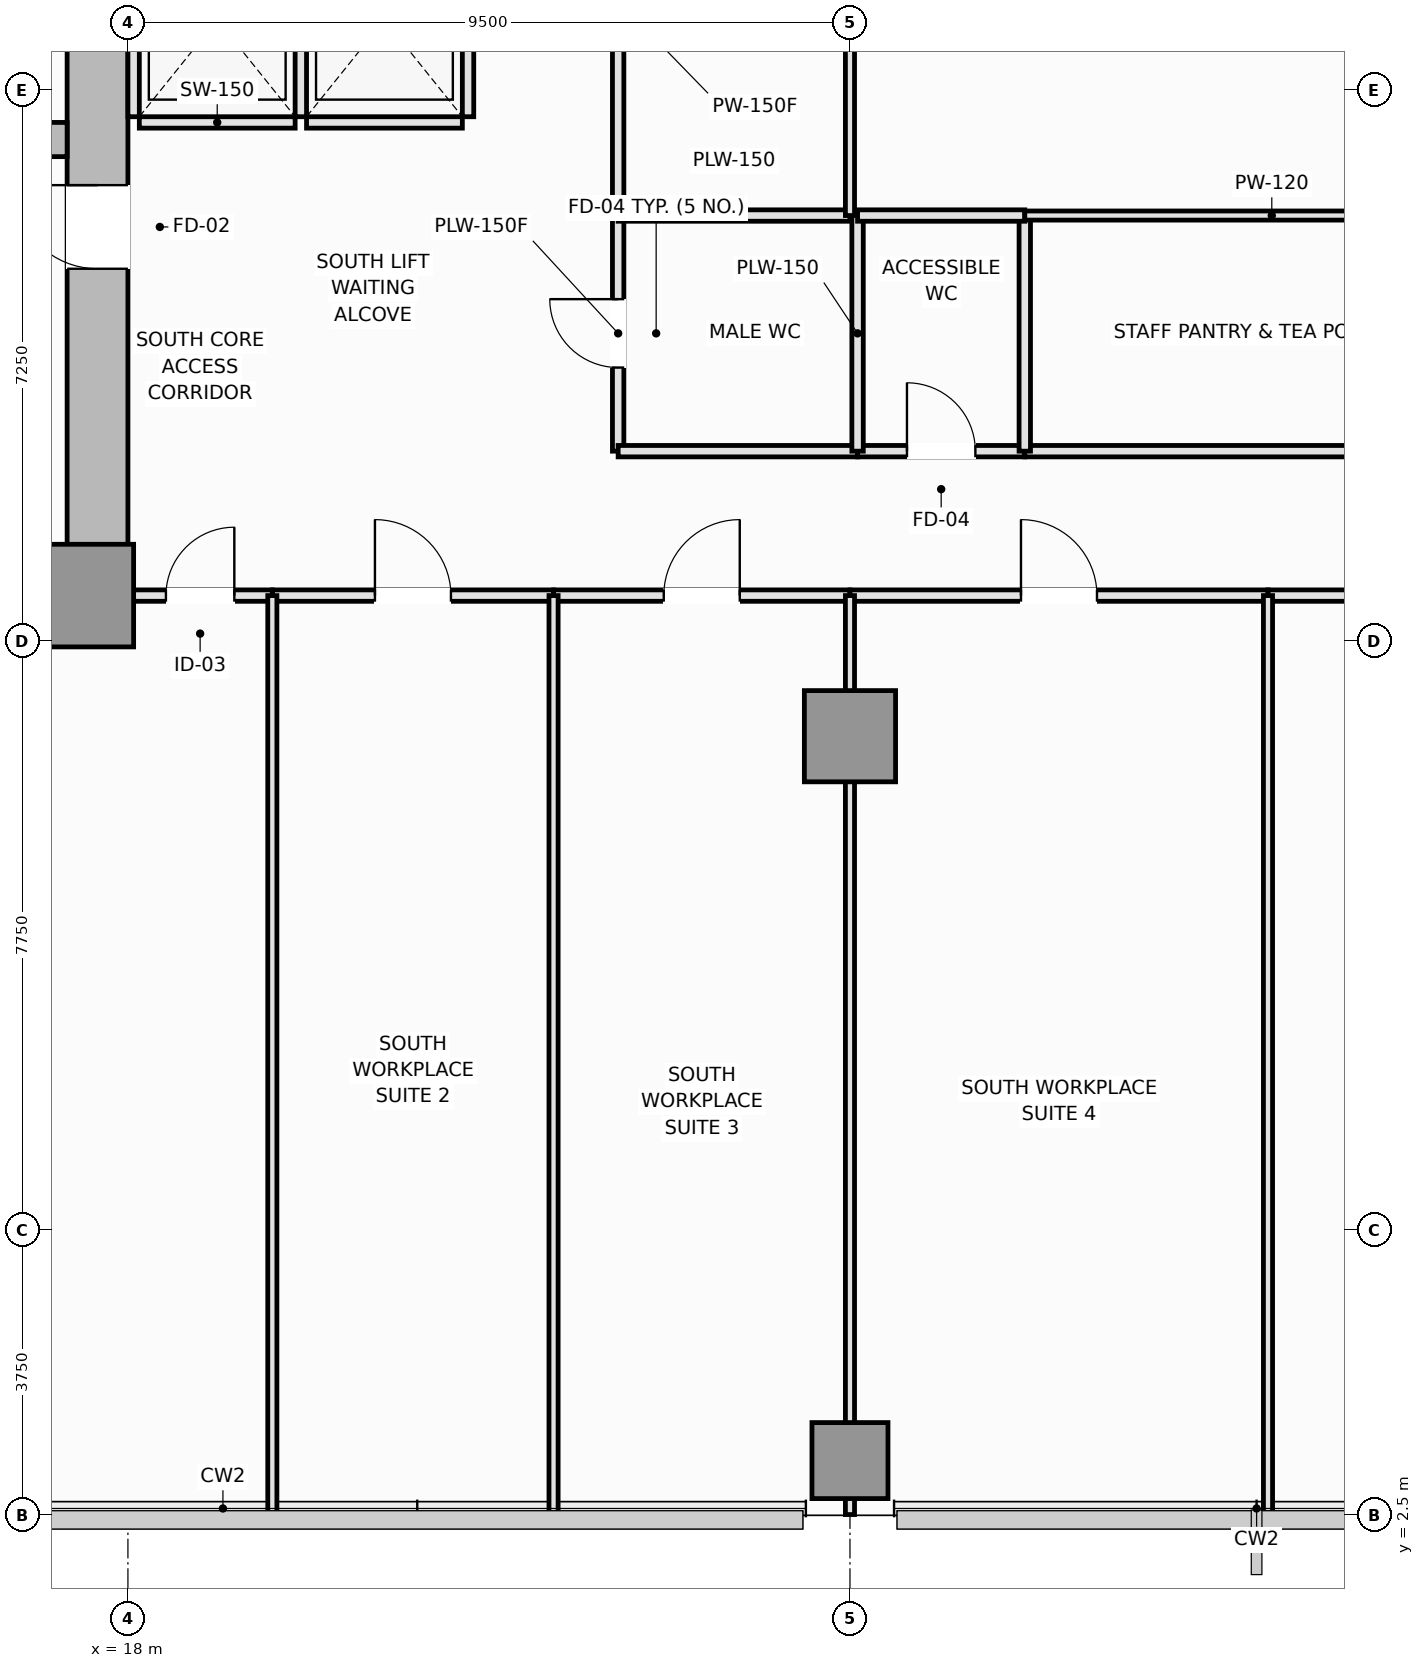
"""IFC4 building model, lengths in metres.
Left out: names, types, materials, properties, quantities, classifications, styles, units other than length and angle.
Written with IfcOpenShell. Run it as: python <this file> out.ifc"""

import sys

from ifc_helpers import new_model, si_unit, direction, frame, frame_2d, origin, origin_2d, place, context, subcontext, project, spatial, rectangle, extrude, element, fill, save


model = new_model("IFC4")
c1 = context("Model", 3, precision=1e-05, world=origin(), true_north=direction((0.0, 1.0)))
c2 = subcontext(c1, "Body", "Model", "MODEL_VIEW")
j1 = project(units=[si_unit("LENGTHUNIT", "METRE"), si_unit("PLANEANGLEUNIT", "RADIAN")], contexts=[c1])
p1 = place(None, origin())
s1 = spatial("IfcSite", under=j1, at=p1, CompositionType="ELEMENT")
p2 = place(p1, origin())
s2 = spatial("IfcBuilding", under=s1, at=p2, CompositionType="ELEMENT")
p3 = place(p2, frame((0.0, 0.0, 57.55)))
s3 = spatial("IfcBuildingStorey", under=s2, at=p3, CompositionType="ELEMENT", Elevation=57.55)
p4 = place(p3, frame((4.5, 14.4, 0.0), z_axis=(0.0, 0.0, 1.0), x_axis=(1.0, 0.0, 0.0)))
e1 = element("IfcWall", 1, at=p4, inside=s3, PredefinedType="SHEAR", context=c2, shape_type="SweptSolid", body=[
    extrude(rectangle(XDim=13.5, YDim=0.8, at=frame_2d((6.75, 0.0))), origin(), (0.0, 0.0, 1.0), 3.55),
])
p5 = place(p3, frame((17.6, 14.8, 0.0), z_axis=(0.0, 0.0, 1.0), x_axis=(0.0, 1.0, 0.0)))
e2 = element("IfcWall", 2, at=p5, inside=s3, PredefinedType="SHEAR", context=c2, shape_type="SweptSolid", body=[
    extrude(rectangle(XDim=8.65, YDim=0.8, at=frame_2d((4.325, 0.0))), origin(), (0.0, 0.0, 1.0), 3.55),
])
p6 = place(p5, frame((4.1, 0.0, 0.0)))
e3 = element("IfcOpeningElement", 3, at=p6, cuts=e2, PredefinedType="OPENING", context=c2, shape_type="SweptSolid", body=[
    extrude(rectangle(XDim=1.1, YDim=2.15, at=frame_2d((0.55, 1.075))), frame((0.0, 0.41, 0.0), z_axis=(0.0, -1.0, 0.0), x_axis=(1.0, 0.0, 0.0)), (0.0, 0.0, 1.0), 0.82),
])
p7 = place(p3, frame((5.3, 20.6, 0.0), z_axis=(0.0, 0.0, 1.0), x_axis=(1.0, 0.0, 0.0)))
e4 = element("IfcWall", 4, at=p7, inside=s3, PredefinedType="SHEAR", context=c2, shape_type="SweptSolid", body=[
    extrude(rectangle(XDim=11.9, YDim=0.45, at=frame_2d((5.95, 0.0))), origin(), (0.0, 0.0, 1.0), 3.55),
])
p8 = place(p3, frame((17.4, 14.6, 0.0), z_axis=(0.0, 0.0, 1.0), x_axis=(1.0, 0.0, 0.0)))
e5 = element("IfcColumn", 5, at=p8, inside=s3, PredefinedType="PILASTER", context=c2, shape_type="SweptSolid", body=[
    extrude(rectangle(XDim=1.35, YDim=1.35, at=origin_2d()), origin(), (0.0, 0.0, 1.0), 3.55),
])
p9 = place(p3, frame((27.5, 12.75, 0.0), z_axis=(0.0, 0.0, 1.0), x_axis=(1.0, 0.0, 0.0)))
e6 = element("IfcColumn", 6, at=p9, inside=s3, PredefinedType="COLUMN", context=c2, shape_type="SweptSolid", body=[
    extrude(rectangle(XDim=1.2, YDim=1.2, at=origin_2d()), origin(), (0.0, 0.0, 1.0), 3.55),
])
p10 = place(p3, frame((27.5, 3.22, 0.0), z_axis=(0.0, 0.0, 1.0), x_axis=(1.0, 0.0, 0.0)))
e7 = element("IfcColumn", 7, at=p10, inside=s3, PredefinedType="COLUMN", context=c2, shape_type="SweptSolid", body=[
    extrude(rectangle(XDim=1.0, YDim=1.0, at=origin_2d()), origin(), (0.0, 0.0, 1.0), 3.55),
])
p11 = place(p3, frame((18.15, 20.825, 0.0), z_axis=(0.0, 0.0, 1.0), x_axis=(1.0, 0.0, 0.0)))
e8 = element("IfcWall", 8, at=p11, inside=s3, PredefinedType="PARTITIONING", context=c2, shape_type="SweptSolid", body=[
    extrude(rectangle(XDim=2.05, YDim=0.15, at=frame_2d((1.025, 0.0))), origin(), (0.0, 0.0, 1.0), 3.37),
])
for number, where, z_axis, x_axis in (
    (9, (18.075, 20.9, 0.0), (0.0, 0.0, 1.0), (0.0, 1.0, 0.0)),
    (10, (20.275, 20.9, 0.0), (0.0, 0.0, 1.0), (0.0, 1.0, 0.0)),
):
    element("IfcWall", number, at=place(p3, frame(where, z_axis=z_axis, x_axis=x_axis)), inside=s3, PredefinedType="PARTITIONING", context=c2, shape_type="SweptSolid", body=[
        extrude(rectangle(XDim=2.55, YDim=0.15, at=frame_2d((1.275, 0.0))), origin(), (0.0, 0.0, 1.0), 3.37),
    ])
p12 = place(p3, frame((20.35, 20.825, 0.0), z_axis=(0.0, 0.0, 1.0), x_axis=(1.0, 0.0, 0.0)))
e11 = element("IfcWall", 11, at=p12, inside=s3, PredefinedType="PARTITIONING", context=c2, shape_type="SweptSolid", body=[
    extrude(rectangle(XDim=2.05, YDim=0.15, at=frame_2d((1.025, 0.0))), origin(), (0.0, 0.0, 1.0), 3.37),
])
p13 = place(p3, frame((22.475, 20.9, 0.0), z_axis=(0.0, 0.0, 1.0), x_axis=(0.0, 1.0, 0.0)))
e12 = element("IfcWall", 12, at=p13, inside=s3, PredefinedType="PARTITIONING", context=c2, shape_type="SweptSolid", body=[
    extrude(rectangle(XDim=2.55, YDim=0.15, at=frame_2d((1.275, 0.0))), origin(), (0.0, 0.0, 1.0), 3.37),
])
p14 = place(p3, frame((24.45, 16.5, 0.0), z_axis=(0.0, 0.0, 1.0), x_axis=(0.0, 1.0, 0.0)))
e13 = element("IfcWall", 13, at=p14, inside=s3, PredefinedType="PLUMBINGWALL", context=c2, shape_type="SweptSolid", body=[
    extrude(rectangle(XDim=3.1, YDim=0.15, at=frame_2d((1.55, 0.0))), origin(), (0.0, 0.0, 1.0), 3.37),
])
p15 = place(p14, frame((1.1, 0.0, 0.0)))
e14 = element("IfcOpeningElement", 14, at=p15, cuts=e13, PredefinedType="OPENING", context=c2, shape_type="SweptSolid", body=[
    extrude(rectangle(XDim=0.9, YDim=2.1, at=frame_2d((0.45, 1.05))), frame((0.0, 0.085, 0.0), z_axis=(0.0, -1.0, 0.0), x_axis=(1.0, 0.0, 0.0)), (0.0, 0.0, 1.0), 0.17),
])
p16 = place(p3, frame((24.45, 19.6, 0.0), z_axis=(0.0, 0.0, 1.0), x_axis=(0.0, 1.0, 0.0)))
e15 = element("IfcWall", 15, at=p16, inside=s3, PredefinedType="PARTITIONING", context=c2, shape_type="SweptSolid", body=[
    extrude(rectangle(XDim=5.65, YDim=0.15, at=frame_2d((2.825, 0.0))), origin(), (0.0, 0.0, 1.0), 3.37),
])
p17 = place(p16, frame((2.325, 0.0, 0.0)))
e16 = element("IfcOpeningElement", 16, at=p17, cuts=e15, PredefinedType="OPENING", context=c2, shape_type="SweptSolid", body=[
    extrude(rectangle(XDim=1.0, YDim=2.15, at=frame_2d((0.5, 1.075))), frame((0.0, 0.085, 0.0), z_axis=(0.0, -1.0, 0.0), x_axis=(1.0, 0.0, 0.0)), (0.0, 0.0, 1.0), 0.17),
])
p18 = place(p3, frame((24.45, 16.5, 0.0), z_axis=(0.0, 0.0, 1.0), x_axis=(1.0, 0.0, 0.0)))
e17 = element("IfcWall", 17, at=p18, inside=s3, PredefinedType="PLUMBINGWALL", context=c2, shape_type="SweptSolid", body=[
    extrude(rectangle(XDim=3.15, YDim=0.15, at=frame_2d((1.575, 0.0))), origin(), (0.0, 0.0, 1.0), 3.37),
])
p19 = place(p3, frame((27.6, 16.5, 0.0), z_axis=(0.0, 0.0, 1.0), x_axis=(1.0, 0.0, 0.0)))
e18 = element("IfcWall", 18, at=p19, inside=s3, PredefinedType="PLUMBINGWALL", context=c2, shape_type="SweptSolid", body=[
    extrude(rectangle(XDim=2.2, YDim=0.15, at=frame_2d((1.1, 0.0))), origin(), (0.0, 0.0, 1.0), 3.37),
])
p20 = place(p19, frame((0.65, 0.0, 0.0)))
e19 = element("IfcOpeningElement", 19, at=p20, cuts=e18, PredefinedType="OPENING", context=c2, shape_type="SweptSolid", body=[
    extrude(rectangle(XDim=0.9, YDim=2.1, at=frame_2d((0.45, 1.05))), frame((0.0, 0.085, 0.0), z_axis=(0.0, -1.0, 0.0), x_axis=(1.0, 0.0, 0.0)), (0.0, 0.0, 1.0), 0.17),
])
p21 = place(p3, frame((29.8, 16.5, 0.0), z_axis=(0.0, 0.0, 1.0), x_axis=(1.0, 0.0, 0.0)))
e20 = element("IfcWall", 20, at=p21, inside=s3, PredefinedType="PARTITIONING", context=c2, shape_type="SweptSolid", body=[
    extrude(rectangle(XDim=6.5, YDim=0.15, at=frame_2d((3.25, 0.0))), origin(), (0.0, 0.0, 1.0), 3.37),
])
p22 = place(p3, frame((18.0, 14.6, 0.0), z_axis=(0.0, 0.0, 1.0), x_axis=(1.0, 0.0, 0.0)))
e21 = element("IfcWall", 21, at=p22, inside=s3, PredefinedType="PARTITIONING", context=c2, shape_type="SweptSolid", body=[
    extrude(rectangle(XDim=1.9, YDim=0.15, at=frame_2d((0.95, 0.0))), origin(), (0.0, 0.0, 1.0), 3.37),
])
p23 = place(p22, frame((0.5, 0.0, 0.0)))
e22 = element("IfcOpeningElement", 22, at=p23, cuts=e21, PredefinedType="OPENING", context=c2, shape_type="SweptSolid", body=[
    extrude(rectangle(XDim=0.9, YDim=2.1, at=frame_2d((0.45, 1.05))), frame((0.0, 0.085, 0.0), z_axis=(0.0, -1.0, 0.0), x_axis=(1.0, 0.0, 0.0)), (0.0, 0.0, 1.0), 0.17),
])
p24 = place(p3, frame((19.9, 14.6, 0.0), z_axis=(0.0, 0.0, 1.0), x_axis=(1.0, 0.0, 0.0)))
e23 = element("IfcWall", 23, at=p24, inside=s3, PredefinedType="PARTITIONING", context=c2, shape_type="SweptSolid", body=[
    extrude(rectangle(XDim=3.7, YDim=0.15, at=frame_2d((1.85, 0.0))), origin(), (0.0, 0.0, 1.0), 3.37),
])
p25 = place(p24, frame((1.35, 0.0, 0.0)))
e24 = element("IfcOpeningElement", 24, at=p25, cuts=e23, PredefinedType="OPENING", context=c2, shape_type="SweptSolid", body=[
    extrude(rectangle(XDim=1.0, YDim=2.15, at=frame_2d((0.5, 1.075))), frame((0.0, 0.085, 0.0), z_axis=(0.0, -1.0, 0.0), x_axis=(1.0, 0.0, 0.0)), (0.0, 0.0, 1.0), 0.17),
])
p26 = place(p3, frame((23.6, 14.6, 0.0), z_axis=(0.0, 0.0, 1.0), x_axis=(1.0, 0.0, 0.0)))
e25 = element("IfcWall", 25, at=p26, inside=s3, PredefinedType="PARTITIONING", context=c2, shape_type="SweptSolid", body=[
    extrude(rectangle(XDim=3.9, YDim=0.15, at=frame_2d((1.95, 0.0))), origin(), (0.0, 0.0, 1.0), 3.37),
])
p27 = place(p26, frame((1.45, 0.0, 0.0)))
e26 = element("IfcOpeningElement", 26, at=p27, cuts=e25, PredefinedType="OPENING", context=c2, shape_type="SweptSolid", body=[
    extrude(rectangle(XDim=1.0, YDim=2.15, at=frame_2d((0.5, 1.075))), frame((0.0, 0.085, 0.0), z_axis=(0.0, -1.0, 0.0), x_axis=(1.0, 0.0, 0.0)), (0.0, 0.0, 1.0), 0.17),
])
p28 = place(p3, frame((27.5, 14.6, 0.0), z_axis=(0.0, 0.0, 1.0), x_axis=(1.0, 0.0, 0.0)))
e27 = element("IfcWall", 27, at=p28, inside=s3, PredefinedType="PARTITIONING", context=c2, shape_type="SweptSolid", body=[
    extrude(rectangle(XDim=5.5, YDim=0.15, at=frame_2d((2.75, 0.0))), origin(), (0.0, 0.0, 1.0), 3.37),
])
p29 = place(p28, frame((2.25, 0.0, 0.0)))
e28 = element("IfcOpeningElement", 28, at=p29, cuts=e27, PredefinedType="OPENING", context=c2, shape_type="SweptSolid", body=[
    extrude(rectangle(XDim=1.0, YDim=2.15, at=frame_2d((0.5, 1.075))), frame((0.0, 0.085, 0.0), z_axis=(0.0, -1.0, 0.0), x_axis=(1.0, 0.0, 0.0)), (0.0, 0.0, 1.0), 0.17),
])
p30 = place(p3, frame((33.0, 14.6, 0.0), z_axis=(0.0, 0.0, 1.0), x_axis=(1.0, 0.0, 0.0)))
e29 = element("IfcWall", 29, at=p30, inside=s3, PredefinedType="PARTITIONING", context=c2, shape_type="SweptSolid", body=[
    extrude(rectangle(XDim=5.2, YDim=0.15, at=frame_2d((2.6, 0.0))), origin(), (0.0, 0.0, 1.0), 3.37),
])
p31 = place(p30, frame((2.1, 0.0, 0.0)))
e30 = element("IfcOpeningElement", 30, at=p31, cuts=e29, PredefinedType="OPENING", context=c2, shape_type="SweptSolid", body=[
    extrude(rectangle(XDim=1.0, YDim=2.15, at=frame_2d((0.5, 1.075))), frame((0.0, 0.085, 0.0), z_axis=(0.0, -1.0, 0.0), x_axis=(1.0, 0.0, 0.0)), (0.0, 0.0, 1.0), 0.17),
])
p32 = place(p3, frame((27.6, 16.5, 0.0), z_axis=(0.0, 0.0, 1.0), x_axis=(0.0, 1.0, 0.0)))
e31 = element("IfcWall", 31, at=p32, inside=s3, PredefinedType="PLUMBINGWALL", context=c2, shape_type="SweptSolid", body=[
    extrude(rectangle(XDim=3.1, YDim=0.15, at=frame_2d((1.55, 0.0))), origin(), (0.0, 0.0, 1.0), 3.37),
])
p33 = place(p3, frame((24.45, 19.6, 0.0), z_axis=(0.0, 0.0, 1.0), x_axis=(1.0, 0.0, 0.0)))
e32 = element("IfcWall", 32, at=p33, inside=s3, PredefinedType="PLUMBINGWALL", context=c2, shape_type="SweptSolid", body=[
    extrude(rectangle(XDim=3.05, YDim=0.15, at=frame_2d((1.525, 0.0))), origin(), (0.0, 0.0, 1.0), 3.37),
])
p34 = place(p3, frame((29.8, 16.5, 0.0), z_axis=(0.0, 0.0, 1.0), x_axis=(0.0, 1.0, 0.0)))
e33 = element("IfcWall", 33, at=p34, inside=s3, PredefinedType="PLUMBINGWALL", context=c2, shape_type="SweptSolid", body=[
    extrude(rectangle(XDim=3.1, YDim=0.15, at=frame_2d((1.55, 0.0))), origin(), (0.0, 0.0, 1.0), 3.37),
])
p35 = place(p3, frame((27.6, 19.6, 0.0), z_axis=(0.0, 0.0, 1.0), x_axis=(1.0, 0.0, 0.0)))
e34 = element("IfcWall", 34, at=p35, inside=s3, PredefinedType="PLUMBINGWALL", context=c2, shape_type="SweptSolid", body=[
    extrude(rectangle(XDim=2.2, YDim=0.15, at=frame_2d((1.1, 0.0))), origin(), (0.0, 0.0, 1.0), 3.37),
])
p36 = place(p3, frame((29.8, 19.6, 0.0), z_axis=(0.0, 0.0, 1.0), x_axis=(1.0, 0.0, 0.0)))
e35 = element("IfcWall", 35, at=p36, inside=s3, PredefinedType="PARTITIONING", context=c2, shape_type="SweptSolid", body=[
    extrude(rectangle(XDim=6.5, YDim=0.12, at=frame_2d((3.25, 0.0))), origin(), (0.0, 0.0, 1.0), 3.37),
])
p37 = place(p3, frame((27.5, 19.6, 0.0), z_axis=(0.0, 0.0, 1.0), x_axis=(0.0, 1.0, 0.0)))
e36 = element("IfcWall", 36, at=p37, inside=s3, PredefinedType="PARTITIONING", context=c2, shape_type="SweptSolid", body=[
    extrude(rectangle(XDim=5.65, YDim=0.12, at=frame_2d((2.825, 0.0))), origin(), (0.0, 0.0, 1.0), 3.37),
])
for number, where, z_axis, x_axis in (
    (37, (19.9, 2.51, 0.0), (0.0, 0.0, 1.0), (0.0, 1.0, 0.0)),
    (38, (23.6, 2.51, 0.0), (0.0, 0.0, 1.0), (0.0, 1.0, 0.0)),
):
    element("IfcWall", number, at=place(p3, frame(where, z_axis=z_axis, x_axis=x_axis)), inside=s3, PredefinedType="PARTITIONING", context=c2, shape_type="SweptSolid", body=[
        extrude(rectangle(XDim=12.09, YDim=0.12, at=frame_2d((6.045, 0.0))), origin(), (0.0, 0.0, 1.0), 3.37),
    ])
p38 = place(p3, frame((27.5, 2.51, 0.0), z_axis=(0.0, 0.0, 1.0), x_axis=(0.0, 1.0, 0.0)))
e39 = element("IfcWall", 39, at=p38, inside=s3, PredefinedType="PARTITIONING", context=c2, shape_type="SweptSolid", body=[
    extrude(rectangle(XDim=12.09, YDim=0.12, at=frame_2d((6.045, 0.0))), origin(), (0.0, 0.0, 1.0), 2.82),
])
p39 = place(p3, frame((33.0, 2.51, 0.0), z_axis=(0.0, 0.0, 1.0), x_axis=(0.0, 1.0, 0.0)))
e40 = element("IfcWall", 40, at=p39, inside=s3, PredefinedType="PARTITIONING", context=c2, shape_type="SweptSolid", body=[
    extrude(rectangle(XDim=12.09, YDim=0.12, at=frame_2d((6.045, 0.0))), origin(), (0.0, 0.0, 1.0), 3.37),
])
p40 = place(p6, origin())
e41 = element("IfcDoor", 41, at=p40, inside=s3, OperationType="SINGLE_SWING_RIGHT", PredefinedType="DOOR", context=c2, shape_type="SweptSolid", body=[
    extrude(rectangle(XDim=1.1, YDim=2.15, at=frame_2d((0.55, 1.075))), frame((0.0, 0.025, 0.0), z_axis=(0.0, -1.0, 0.0), x_axis=(1.0, 0.0, 0.0)), (0.0, 0.0, 1.0), 0.05),
])
fill(e3, e41)
p41 = place(p15, origin())
e42 = element("IfcDoor", 42, at=p41, inside=s3, OperationType="SINGLE_SWING_RIGHT", PredefinedType="DOOR", context=c2, shape_type="SweptSolid", body=[
    extrude(rectangle(XDim=0.9, YDim=2.1, at=frame_2d((0.45, 1.05))), frame((0.0, 0.025, 0.0), z_axis=(0.0, -1.0, 0.0), x_axis=(1.0, 0.0, 0.0)), (0.0, 0.0, 1.0), 0.05),
])
fill(e14, e42)
p42 = place(p20, origin())
e43 = element("IfcDoor", 43, at=p42, inside=s3, OperationType="SINGLE_SWING_LEFT", PredefinedType="DOOR", context=c2, shape_type="SweptSolid", body=[
    extrude(rectangle(XDim=0.9, YDim=2.1, at=frame_2d((0.45, 1.05))), frame((0.0, 0.025, 0.0), z_axis=(0.0, -1.0, 0.0), x_axis=(1.0, 0.0, 0.0)), (0.0, 0.0, 1.0), 0.05),
])
fill(e19, e43)
p43 = place(p23, origin())
e44 = element("IfcDoor", 44, at=p43, inside=s3, OperationType="SINGLE_SWING_RIGHT", PredefinedType="DOOR", context=c2, shape_type="SweptSolid", body=[
    extrude(rectangle(XDim=0.9, YDim=2.1, at=frame_2d((0.45, 1.05))), frame((0.0, 0.025, 0.0), z_axis=(0.0, -1.0, 0.0), x_axis=(1.0, 0.0, 0.0)), (0.0, 0.0, 1.0), 0.05),
])
fill(e22, e44)
p44 = place(p25, origin())
e45 = element("IfcDoor", 45, at=p44, inside=s3, OperationType="SINGLE_SWING_LEFT", PredefinedType="DOOR", context=c2, shape_type="SweptSolid", body=[
    extrude(rectangle(XDim=1.0, YDim=2.15, at=frame_2d((0.5, 1.075))), frame((0.0, 0.025, 0.0), z_axis=(0.0, -1.0, 0.0), x_axis=(1.0, 0.0, 0.0)), (0.0, 0.0, 1.0), 0.05),
])
fill(e24, e45)
p45 = place(p27, origin())
e46 = element("IfcDoor", 46, at=p45, inside=s3, OperationType="SINGLE_SWING_RIGHT", PredefinedType="DOOR", context=c2, shape_type="SweptSolid", body=[
    extrude(rectangle(XDim=1.0, YDim=2.15, at=frame_2d((0.5, 1.075))), frame((0.0, 0.025, 0.0), z_axis=(0.0, -1.0, 0.0), x_axis=(1.0, 0.0, 0.0)), (0.0, 0.0, 1.0), 0.05),
])
fill(e26, e46)
p46 = place(p29, origin())
e47 = element("IfcDoor", 47, at=p46, inside=s3, OperationType="SINGLE_SWING_LEFT", PredefinedType="DOOR", context=c2, shape_type="SweptSolid", body=[
    extrude(rectangle(XDim=1.0, YDim=2.15, at=frame_2d((0.5, 1.075))), frame((0.0, 0.025, 0.0), z_axis=(0.0, -1.0, 0.0), x_axis=(1.0, 0.0, 0.0)), (0.0, 0.0, 1.0), 0.05),
])
fill(e28, e47)
save(model, sys.argv[1])
